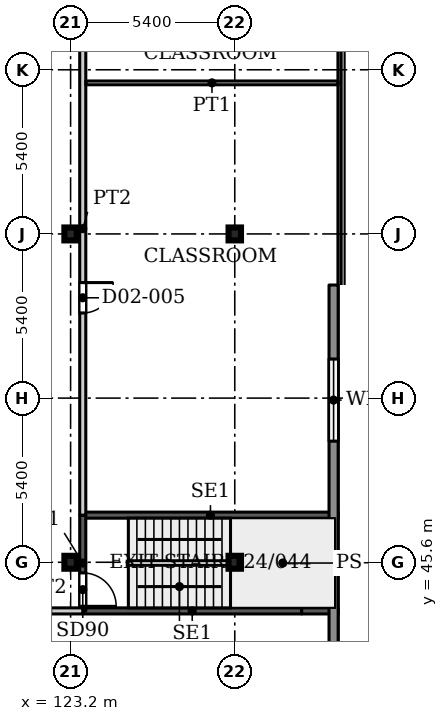
"""IFC4 building model, lengths in metres.
Left out: names, types, materials, properties, quantities, classifications, styles, units other than length and angle.
Written with IfcOpenShell. Run it as: python <this file> out.ifc"""

import sys

from ifc_helpers import new_model, si_unit, direction, frame, frame_2d, origin, origin_2d, place, context, subcontext, project, spatial, rectangle, i_section, extrude, source, transform, mapped, element, fill, save


model = new_model("IFC4")
c1 = context("Model", 3, precision=1e-05, world=origin(), true_north=direction((0.0, 1.0)))
c2 = subcontext(c1, "Body", "Model", "MODEL_VIEW")
j1 = project(units=[si_unit("LENGTHUNIT", "METRE"), si_unit("PLANEANGLEUNIT", "RADIAN")], contexts=[c1])
p1 = place(None, origin())
s1 = spatial("IfcSite", under=j1, at=p1, CompositionType="ELEMENT")
p2 = place(p1, origin())
s2 = spatial("IfcBuilding", under=s1, at=p2, CompositionType="ELEMENT")
p3 = place(p2, frame((0.0, 0.0, 12.5)))
s3 = spatial("IfcBuildingStorey", under=s2, at=p3, CompositionType="ELEMENT", Elevation=12.5)
for number, where, z_axis, x_axis in (
    (1, (123.2, 45.6, 0.0), (0.0, 0.0, 1.0), (1.0, 0.0, 0.0)),
    (2, (128.6, 45.6, 0.0), (0.0, 0.0, 1.0), (1.0, 0.0, 0.0)),
    (3, (123.2, 56.4, 0.0), (0.0, 0.0, 1.0), (1.0, 0.0, 0.0)),
    (4, (128.6, 56.4, 0.0), (0.0, 0.0, 1.0), (1.0, 0.0, 0.0)),
):
    element("IfcColumn", number, at=place(p3, frame(where, z_axis=z_axis, x_axis=x_axis)), inside=s3, PredefinedType="COLUMN", context=c2, shape_type="SweptSolid", body=[
        extrude(i_section(OverallWidth=0.409, OverallDepth=0.425, WebThickness=0.033, FlangeThickness=0.052, FilletRadius=0.013, at=origin_2d()), origin(), (0.0, 0.0, 1.0), 4.5),
    ])
p4 = place(p3, frame((131.85, 54.72, 0.0), z_axis=(0.0, 0.0, 1.0), x_axis=(0.0, -1.0, 0.0)))
e5 = element("IfcWall", 5, at=p4, inside=s3, PredefinedType="SOLIDWALL", context=c2, shape_type="SweptSolid", body=[
    extrude(rectangle(XDim=38.72, YDim=0.3, at=frame_2d((19.36, 0.0))), origin(), (0.0, 0.0, 1.0), 4.25),
])
p5 = place(p4, frame((2.435, 0.0, 0.9)))
e6 = element("IfcOpeningElement", 6, at=p5, cuts=e5, PredefinedType="OPENING", context=c2, shape_type="SweptSolid", body=[
    extrude(rectangle(XDim=2.7, YDim=2.1, at=frame_2d((1.35, 1.05))), frame((0.0, 0.16, 0.0), z_axis=(0.0, -1.0, 0.0), x_axis=(1.0, 0.0, 0.0)), (0.0, 0.0, 1.0), 0.32),
])
p6 = place(p4, frame((13.58, 0.0, 0.9)))
e7 = element("IfcOpeningElement", 7, at=p6, cuts=e5, PredefinedType="OPENING", context=c2, shape_type="SweptSolid", body=[
    extrude(rectangle(XDim=2.7, YDim=2.1, at=frame_2d((1.35, 1.05))), frame((0.0, 0.16, 0.0), z_axis=(0.0, -1.0, 0.0), x_axis=(1.0, 0.0, 0.0)), (0.0, 0.0, 1.0), 0.32),
])
p7 = place(p4, frame((26.16, 0.0, 0.9)))
e8 = element("IfcOpeningElement", 8, at=p7, cuts=e5, PredefinedType="OPENING", context=c2, shape_type="SweptSolid", body=[
    extrude(rectangle(XDim=2.7, YDim=2.1, at=frame_2d((1.35, 1.05))), frame((0.0, 0.16, 0.0), z_axis=(0.0, -1.0, 0.0), x_axis=(1.0, 0.0, 0.0)), (0.0, 0.0, 1.0), 0.32),
])
p8 = place(p3, frame((123.6, 44.0, 0.0), z_axis=(0.0, 0.0, 1.0), x_axis=(1.0, 0.0, 0.0)))
e9 = element("IfcWall", 9, at=p8, inside=s3, PredefinedType="SHEAR", context=c2, shape_type="SweptSolid", body=[
    extrude(rectangle(XDim=7.2, YDim=0.2, at=frame_2d((3.6, 0.0))), origin(), (0.0, 0.0, 1.0), 4.5),
])
p9 = place(p3, frame((130.8, 44.0, 0.0), z_axis=(0.0, 0.0, 1.0), x_axis=(1.0, 0.0, 0.0)))
e10 = element("IfcWall", 10, at=p9, inside=s3, PredefinedType="SHEAR", context=c2, shape_type="SweptSolid", body=[
    extrude(rectangle(XDim=1.2, YDim=0.2, at=frame_2d((0.6, 0.0))), origin(), (0.0, 0.0, 1.0), 4.5),
])
p10 = place(p3, frame((123.6, 47.15, 0.0), z_axis=(0.0, 0.0, 1.0), x_axis=(1.0, 0.0, 0.0)))
e11 = element("IfcWall", 11, at=p10, inside=s3, PredefinedType="SHEAR", context=c2, shape_type="SweptSolid", body=[
    extrude(rectangle(XDim=8.4, YDim=0.2, at=frame_2d((4.2, 0.0))), origin(), (0.0, 0.0, 1.0), 4.5),
])
p11 = place(p3, frame((123.6, 44.0, 0.0), z_axis=(0.0, 0.0, 1.0), x_axis=(0.0, 1.0, 0.0)))
e12 = element("IfcWall", 12, at=p11, inside=s3, PredefinedType="SHEAR", context=c2, shape_type="SweptSolid", body=[
    extrude(rectangle(XDim=3.15, YDim=0.2, at=frame_2d((1.575, 0.0))), origin(), (0.0, 0.0, 1.0), 4.5),
])
p12 = place(p11, frame((0.15, 0.0, 0.0)))
e13 = element("IfcOpeningElement", 13, at=p12, cuts=e12, PredefinedType="OPENING", context=c2, shape_type="SweptSolid", body=[
    extrude(rectangle(XDim=1.1, YDim=2.2, at=frame_2d((0.55, 1.1))), frame((0.0, 0.11, 0.0), z_axis=(0.0, -1.0, 0.0), x_axis=(1.0, 0.0, 0.0)), (0.0, 0.0, 1.0), 0.22),
])
p13 = place(p3, frame((121.3, 44.0, 0.0), z_axis=(0.0, 0.0, 1.0), x_axis=(1.0, 0.0, 0.0)))
e14 = element("IfcWall", 14, at=p13, inside=s3, PredefinedType="PARTITIONING", context=c2, shape_type="SweptSolid", body=[
    extrude(rectangle(XDim=2.3, YDim=0.2, at=frame_2d((1.15, 0.0))), origin(), (0.0, 0.0, 1.0), 4.18),
])
p14 = place(p3, frame((123.6, 47.15, 0.0), z_axis=(0.0, 0.0, 1.0), x_axis=(0.0, 1.0, 0.0)))
e15 = element("IfcWall", 15, at=p14, inside=s3, PredefinedType="PARTITIONING", context=c2, shape_type="SweptSolid", body=[
    extrude(rectangle(XDim=18.85, YDim=0.2, at=frame_2d((9.425, 0.0))), origin(), (0.0, 0.0, 1.0), 4.18),
])
p15 = place(p14, frame((6.65, 0.0, 0.0)))
e16 = element("IfcOpeningElement", 16, at=p15, cuts=e15, PredefinedType="OPENING", context=c2, shape_type="SweptSolid", body=[
    extrude(rectangle(XDim=1.0, YDim=2.1, at=frame_2d((0.5, 1.05))), frame((0.0, 0.11, 0.0), z_axis=(0.0, -1.0, 0.0), x_axis=(1.0, 0.0, 0.0)), (0.0, 0.0, 1.0), 0.22),
])
p16 = place(p14, frame((16.119, 0.0, 0.0)))
e17 = element("IfcOpeningElement", 17, at=p16, cuts=e15, PredefinedType="OPENING", context=c2, shape_type="SweptSolid", body=[
    extrude(rectangle(XDim=1.0, YDim=2.1, at=frame_2d((0.5, 1.05))), frame((0.0, 0.11, 0.0), z_axis=(0.0, -1.0, 0.0), x_axis=(1.0, 0.0, 0.0)), (0.0, 0.0, 1.0), 0.22),
])
p17 = place(p3, frame((123.7, 61.369, 0.0), z_axis=(0.0, 0.0, 1.0), x_axis=(1.0, 0.0, 0.0)))
e18 = element("IfcWall", 18, at=p17, inside=s3, PredefinedType="PARTITIONING", context=c2, shape_type="SweptSolid", body=[
    extrude(rectangle(XDim=8.3, YDim=0.125, at=frame_2d((4.15, 0.0))), origin(), (0.0, 0.0, 1.0), 4.18),
])
m1 = source(origin(), c2, "Body", "SweptSolid", [
    extrude(rectangle(XDim=2.7, YDim=2.1, at=frame_2d((1.35, 1.05))), frame((0.0, 0.03, 0.0), z_axis=(0.0, -1.0, 0.0), x_axis=(1.0, 0.0, 0.0)), (0.0, 0.0, 1.0), 0.06),
])
p18 = place(p5, origin())
e19 = element("IfcWindow", 19, at=p18, inside=s3, PartitioningType="SINGLE_PANEL", PredefinedType="WINDOW", context=c2, shape_type="MappedRepresentation", body=[
    mapped(m1, transform((0.0, 0.0, 0.0), x_axis=(1.0, 0.0, 0.0), y_axis=(0.0, 1.0, 0.0), z_axis=(0.0, 0.0, 1.0), scale=1.0)),
])
fill(e6, e19)
m2 = source(origin(), c2, "Body", "SweptSolid", [
    extrude(rectangle(XDim=1.1, YDim=2.2, at=frame_2d((0.55, 1.1))), frame((0.0, 0.025, 0.0), z_axis=(0.0, -1.0, 0.0), x_axis=(1.0, 0.0, 0.0)), (0.0, 0.0, 1.0), 0.05),
])
p19 = place(p12, origin())
e20 = element("IfcDoor", 20, at=p19, inside=s3, OperationType="SINGLE_SWING_RIGHT", PredefinedType="DOOR", context=c2, shape_type="MappedRepresentation", body=[
    mapped(m2, transform((0.0, 0.0, 0.0), x_axis=(1.0, 0.0, 0.0), y_axis=(0.0, 1.0, 0.0), z_axis=(0.0, 0.0, 1.0), scale=1.0)),
])
fill(e13, e20)
m3 = source(origin(), c2, "Body", "SweptSolid", [
    extrude(rectangle(XDim=1.0, YDim=2.1, at=frame_2d((0.5, 1.05))), frame((0.0, 0.025, 0.0), z_axis=(0.0, -1.0, 0.0), x_axis=(1.0, 0.0, 0.0)), (0.0, 0.0, 1.0), 0.05),
])
p20 = place(p15, origin())
e21 = element("IfcDoor", 21, at=p20, inside=s3, OperationType="SINGLE_SWING_RIGHT", PredefinedType="DOOR", context=c2, shape_type="MappedRepresentation", body=[
    mapped(m3, transform((0.0, 0.0, 0.0), x_axis=(1.0, 0.0, 0.0), y_axis=(0.0, 1.0, 0.0), z_axis=(0.0, 0.0, 1.0), scale=1.0)),
])
fill(e16, e21)
save(model, sys.argv[1])
